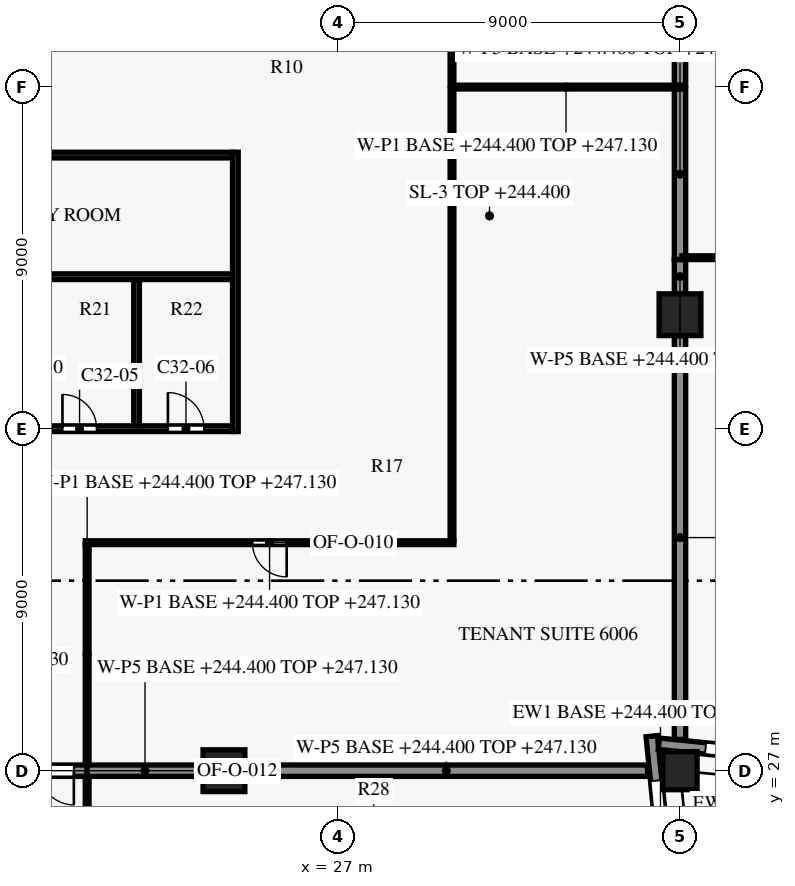
"""IFC4 building model, lengths in metres.
Left out: names, types, materials, properties, quantities, classifications, styles, units other than length and angle.
Written with IfcOpenShell. Run it as: python <this file> out.ifc"""

import sys

from ifc_helpers import new_model, si_unit, direction, frame, frame_2d, origin, origin_2d, place, context, subcontext, project, spatial, rectangle, extrude, element, fill, save


model = new_model("IFC4")
c1 = context("Model", 3, precision=1e-05, world=origin(), true_north=direction((0.0, 1.0)))
c2 = subcontext(c1, "Body", "Model", "MODEL_VIEW")
j1 = project(units=[si_unit("LENGTHUNIT", "METRE"), si_unit("PLANEANGLEUNIT", "RADIAN")], contexts=[c1])
p1 = place(None, origin())
s1 = spatial("IfcSite", under=j1, at=p1, CompositionType="ELEMENT")
p2 = place(p1, origin())
s2 = spatial("IfcBuilding", under=s1, at=p2, CompositionType="ELEMENT")
p3 = place(p2, frame((0.0, 0.0, 244.4)))
s3 = spatial("IfcBuildingStorey", under=s2, at=p3, CompositionType="ELEMENT", Elevation=244.4)
p4 = place(p3, frame((36.0, 27.0, 0.0), z_axis=(0.0, 0.0, 1.0), x_axis=(-0.0995038382, 0.995037178292, 0.0)))
e1 = element("IfcColumn", 1, at=p4, inside=s3, PredefinedType="COLUMN", context=c2, shape_type="SweptSolid", body=[
    extrude(rectangle(XDim=0.9, YDim=1.0, at=origin_2d()), origin(), (0.0, 0.0, 1.0), 3.8),
])
for number, where, z_axis, x_axis in (
    (2, (24.0, 27.0, 0.0), (0.0, 0.0, 1.0), (1.0, 0.0, 0.0)),
    (3, (36.0, 39.0, 0.0), (0.0, 0.0, 1.0), (1.0, 0.0, 0.0)),
):
    element("IfcColumn", number, at=place(p3, frame(where, z_axis=z_axis, x_axis=x_axis)), inside=s3, PredefinedType="COLUMN", context=c2, shape_type="SweptSolid", body=[
        extrude(rectangle(XDim=1.1, YDim=1.1, at=origin_2d()), origin(), (0.0, 0.0, 1.0), 3.8),
    ])
p5 = place(p3, frame((35.256, 27.908, 0.0), z_axis=(0.0, 0.0, 1.0), x_axis=(0.099535070904, -0.995034054523, 0.0)))
e4 = element("IfcWall", 4, at=p5, inside=s3, PredefinedType="SOLIDWALL", context=c2, shape_type="SweptSolid", body=[
    extrude(rectangle(XDim=4.626, YDim=0.3, at=frame_2d((2.313, 0.0))), origin(), (0.0, 0.0, 1.0), 3.0),
])
p6 = place(p5, frame((1.176, 0.0, 0.15)))
e5 = element("IfcOpeningElement", 5, at=p6, cuts=e4, PredefinedType="OPENING", context=c2, shape_type="SweptSolid", body=[
    extrude(rectangle(XDim=3.3, YDim=2.4, at=frame_2d((1.65, 1.2))), frame((0.0, 0.16, 0.0), z_axis=(0.0, -1.0, 0.0), x_axis=(1.0, 0.0, 0.0)), (0.0, 0.0, 1.0), 0.32),
])
p7 = place(p3, frame((45.015, 26.752, 0.0), z_axis=(0.0, 0.0, 1.0), x_axis=(-0.9950379439, 0.099496181828, 0.0)))
e6 = element("IfcWall", 6, at=p7, inside=s3, PredefinedType="SOLIDWALL", context=c2, shape_type="SweptSolid", body=[
    extrude(rectangle(XDim=9.621, YDim=0.3, at=frame_2d((4.811, 0.0))), origin(), (0.0, 0.0, 1.0), 3.0),
])
p8 = place(p7, frame((1.311, 0.0, 0.75)))
e7 = element("IfcOpeningElement", 7, at=p8, cuts=e6, PredefinedType="OPENING", context=c2, shape_type="SweptSolid", body=[
    extrude(rectangle(XDim=1.8, YDim=1.8, at=frame_2d((0.9, 0.9))), frame((0.0, 0.16, 0.0), z_axis=(0.0, -1.0, 0.0), x_axis=(1.0, 0.0, 0.0)), (0.0, 0.0, 1.0), 0.32),
])
p9 = place(p7, frame((5.083, 0.0, 0.15)))
e8 = element("IfcOpeningElement", 8, at=p9, cuts=e6, PredefinedType="OPENING", context=c2, shape_type="SweptSolid", body=[
    extrude(rectangle(XDim=3.3, YDim=2.4, at=frame_2d((1.65, 1.2))), frame((0.0, 0.16, 0.0), z_axis=(0.0, -1.0, 0.0), x_axis=(1.0, 0.0, 0.0)), (0.0, 0.0, 1.0), 0.32),
])
p10 = place(p3, frame((12.4, 36.0, 0.0), z_axis=(0.0, 0.0, 1.0), x_axis=(1.0, 0.0, 0.0)))
e9 = element("IfcWall", 9, at=p10, inside=s3, PredefinedType="SHEAR", context=c2, shape_type="SweptSolid", body=[
    extrude(rectangle(XDim=11.825, YDim=0.15, at=frame_2d((5.913, 0.0))), origin(), (0.0, 0.0, 1.0), 3.5),
])
p11 = place(p10, frame((1.05, 0.0, 0.0)))
e10 = element("IfcOpeningElement", 10, at=p11, cuts=e9, PredefinedType="OPENING", context=c2, shape_type="SweptSolid", body=[
    extrude(rectangle(XDim=0.9, YDim=2.1, at=frame_2d((0.45, 1.05))), frame((0.0, 0.085, 0.0), z_axis=(0.0, -1.0, 0.0), x_axis=(1.0, 0.0, 0.0)), (0.0, 0.0, 1.0), 0.17),
])
p12 = place(p10, frame((4.15, 0.0, 0.0)))
e11 = element("IfcOpeningElement", 11, at=p12, cuts=e9, PredefinedType="OPENING", context=c2, shape_type="SweptSolid", body=[
    extrude(rectangle(XDim=1.0, YDim=2.1, at=frame_2d((0.5, 1.05))), frame((0.0, 0.085, 0.0), z_axis=(0.0, -1.0, 0.0), x_axis=(1.0, 0.0, 0.0)), (0.0, 0.0, 1.0), 0.17),
])
p13 = place(p10, frame((7.35, 0.0, 0.0)))
e12 = element("IfcOpeningElement", 12, at=p13, cuts=e9, PredefinedType="OPENING", context=c2, shape_type="SweptSolid", body=[
    extrude(rectangle(XDim=0.9, YDim=2.1, at=frame_2d((0.45, 1.05))), frame((0.0, 0.085, 0.0), z_axis=(0.0, -1.0, 0.0), x_axis=(1.0, 0.0, 0.0)), (0.0, 0.0, 1.0), 0.17),
])
p14 = place(p10, frame((10.125, 0.0, 0.0)))
e13 = element("IfcOpeningElement", 13, at=p14, cuts=e9, PredefinedType="OPENING", context=c2, shape_type="SweptSolid", body=[
    extrude(rectangle(XDim=0.95, YDim=2.1, at=frame_2d((0.475, 1.05))), frame((0.0, 0.085, 0.0), z_axis=(0.0, -1.0, 0.0), x_axis=(1.0, 0.0, 0.0)), (0.0, 0.0, 1.0), 0.17),
])
p15 = place(p3, frame((8.1, 40.0, 0.0), z_axis=(0.0, 0.0, 1.0), x_axis=(1.0, 0.0, 0.0)))
e14 = element("IfcWall", 14, at=p15, inside=s3, PredefinedType="PARTITIONING", context=c2, shape_type="SweptSolid", body=[
    extrude(rectangle(XDim=16.125, YDim=0.15, at=frame_2d((8.062, 0.0))), origin(), (0.0, 0.0, 1.0), 3.35),
])
p16 = place(p3, frame((8.1, 43.2, 0.0), z_axis=(0.0, 0.0, 1.0), x_axis=(1.0, 0.0, 0.0)))
e15 = element("IfcWall", 15, at=p16, inside=s3, PredefinedType="PARTITIONING", context=c2, shape_type="SweptSolid", body=[
    extrude(rectangle(XDim=16.125, YDim=0.15, at=frame_2d((8.062, 0.0))), origin(), (0.0, 0.0, 1.0), 3.35),
])
p17 = place(p16, frame((1.575, 0.0, 0.0)))
e16 = element("IfcOpeningElement", 16, at=p17, cuts=e15, PredefinedType="OPENING", context=c2, shape_type="SweptSolid", body=[
    extrude(rectangle(XDim=0.9, YDim=2.1, at=frame_2d((0.45, 1.05))), frame((0.0, 0.085, 0.0), z_axis=(0.0, -1.0, 0.0), x_axis=(1.0, 0.0, 0.0)), (0.0, 0.0, 1.0), 0.17),
])
p18 = place(p16, frame((9.675, 0.0, 0.0)))
e17 = element("IfcOpeningElement", 17, at=p18, cuts=e15, PredefinedType="OPENING", context=c2, shape_type="SweptSolid", body=[
    extrude(rectangle(XDim=0.9, YDim=2.1, at=frame_2d((0.45, 1.05))), frame((0.0, 0.085, 0.0), z_axis=(0.0, -1.0, 0.0), x_axis=(1.0, 0.0, 0.0)), (0.0, 0.0, 1.0), 0.17),
])
p19 = place(p3, frame((21.7, 36.075, 0.0), z_axis=(0.0, 0.0, 1.0), x_axis=(0.0, 1.0, 0.0)))
e18 = element("IfcWall", 18, at=p19, inside=s3, PredefinedType="PARTITIONING", context=c2, shape_type="SweptSolid", body=[
    extrude(rectangle(XDim=3.85, YDim=0.15, at=frame_2d((1.925, 0.0))), origin(), (0.0, 0.0, 1.0), 3.35),
])
p20 = place(p3, frame((24.3, 35.925, 0.0), z_axis=(0.0, 0.0, 1.0), x_axis=(0.0, 1.0, 0.0)))
e19 = element("IfcWall", 19, at=p20, inside=s3, PredefinedType="PARTITIONING", context=c2, shape_type="SweptSolid", body=[
    extrude(rectangle(XDim=7.35, YDim=0.15, at=frame_2d((3.675, 0.0))), origin(), (0.0, 0.0, 1.0), 3.35),
])
p21 = place(p3, frame((20.4, 26.83, 0.0), z_axis=(0.0, 0.0, 1.0), x_axis=(0.0, -1.0, 0.0)))
e20 = element("IfcWall", 20, at=p21, inside=s3, PredefinedType="PARTITIONING", context=c2, shape_type="SweptSolid", body=[
    extrude(rectangle(XDim=4.28, YDim=0.1, at=frame_2d((2.14, 0.0))), origin(), (0.0, 0.0, 1.0), 2.73),
])
p22 = place(p21, frame((1.18, 0.0, 0.0)))
e21 = element("IfcOpeningElement", 21, at=p22, cuts=e20, PredefinedType="OPENING", context=c2, shape_type="SweptSolid", body=[
    extrude(rectangle(XDim=1.8, YDim=2.1, at=frame_2d((0.9, 1.05))), frame((0.0, 0.06, 0.0), z_axis=(0.0, -1.0, 0.0), x_axis=(1.0, 0.0, 0.0)), (0.0, 0.0, 1.0), 0.12),
])
p23 = place(p3, frame((20.4, 27.0, 0.0), z_axis=(0.0, 0.0, 1.0), x_axis=(-1.0, 0.0, 0.0)))
e22 = element("IfcWall", 22, at=p23, inside=s3, PredefinedType="PARTITIONING", context=c2, shape_type="SweptSolid", body=[
    extrude(rectangle(XDim=2.5, YDim=0.3, at=frame_2d((1.25, 0.0))), origin(), (0.0, 0.0, 1.0), 2.73),
])
p24 = place(p23, frame((0.35, 0.0, 0.0)))
e23 = element("IfcOpeningElement", 23, at=p24, cuts=e22, PredefinedType="OPENING", context=c2, shape_type="SweptSolid", body=[
    extrude(rectangle(XDim=1.8, YDim=2.1, at=frame_2d((0.9, 1.05))), frame((0.0, 0.16, 0.0), z_axis=(0.0, -1.0, 0.0), x_axis=(1.0, 0.0, 0.0)), (0.0, 0.0, 1.0), 0.32),
])
p25 = place(p3, frame((20.4, 27.0, 0.0), z_axis=(0.0, 0.0, 1.0), x_axis=(1.0, 0.0, 0.0)))
e24 = element("IfcWall", 24, at=p25, inside=s3, PredefinedType="PARTITIONING", context=c2, shape_type="SweptSolid", body=[
    extrude(rectangle(XDim=3.045, YDim=0.3, at=frame_2d((1.522, 0.0))), origin(), (0.0, 0.0, 1.0), 2.73),
])
p26 = place(p3, frame((24.555, 27.0, 0.0), z_axis=(0.0, 0.0, 1.0), x_axis=(1.0, 0.0, 0.0)))
e25 = element("IfcWall", 25, at=p26, inside=s3, PredefinedType="PARTITIONING", context=c2, shape_type="SweptSolid", body=[
    extrude(rectangle(XDim=10.591, YDim=0.3, at=frame_2d((5.295, 0.0))), origin(), (0.0, 0.0, 1.0), 2.73),
])
p27 = place(p3, frame((36.0, 27.824, 0.0), z_axis=(0.0, 0.0, 1.0), x_axis=(0.0, 1.0, 0.0)))
e26 = element("IfcWall", 26, at=p27, inside=s3, PredefinedType="PARTITIONING", context=c2, shape_type="SweptSolid", body=[
    extrude(rectangle(XDim=10.621, YDim=0.3, at=frame_2d((5.311, 0.0))), origin(), (0.0, 0.0, 1.0), 2.73),
])
p28 = place(p3, frame((20.4, 32.95, 0.0), z_axis=(0.0, 0.0, 1.0), x_axis=(0.0, -1.0, 0.0)))
e27 = element("IfcWall", 27, at=p28, inside=s3, PredefinedType="PARTITIONING", context=c2, shape_type="SweptSolid", body=[
    extrude(rectangle(XDim=5.78, YDim=0.1, at=frame_2d((2.89, 0.0))), origin(), (0.0, 0.0, 1.0), 2.73),
])
p29 = place(p3, frame((30.05, 33.0, 0.0), z_axis=(0.0, 0.0, 1.0), x_axis=(-1.0, 0.0, 0.0)))
e28 = element("IfcWall", 28, at=p29, inside=s3, PredefinedType="PARTITIONING", context=c2, shape_type="SweptSolid", body=[
    extrude(rectangle(XDim=9.7, YDim=0.1, at=frame_2d((4.85, 0.0))), origin(), (0.0, 0.0, 1.0), 2.73),
])
p30 = place(p29, frame((4.4, 0.0, 0.0)))
e29 = element("IfcOpeningElement", 29, at=p30, cuts=e28, PredefinedType="OPENING", context=c2, shape_type="SweptSolid", body=[
    extrude(rectangle(XDim=0.9, YDim=2.1, at=frame_2d((0.45, 1.05))), frame((0.0, 0.06, 0.0), z_axis=(0.0, -1.0, 0.0), x_axis=(1.0, 0.0, 0.0)), (0.0, 0.0, 1.0), 0.12),
])
p31 = place(p3, frame((36.0, 39.555, 0.0), z_axis=(0.0, 0.0, 1.0), x_axis=(0.0, 1.0, 0.0)))
e30 = element("IfcWall", 30, at=p31, inside=s3, PredefinedType="PARTITIONING", context=c2, shape_type="SweptSolid", body=[
    extrude(rectangle(XDim=0.895, YDim=0.3, at=frame_2d((0.448, 0.0))), origin(), (0.0, 0.0, 1.0), 2.73),
])
p32 = place(p3, frame((49.45, 40.5, 0.0), z_axis=(0.0, 0.0, 1.0), x_axis=(-1.0, 0.0, 0.0)))
e31 = element("IfcWall", 31, at=p32, inside=s3, PredefinedType="PARTITIONING", context=c2, shape_type="SweptSolid", body=[
    extrude(rectangle(XDim=13.4, YDim=0.1, at=frame_2d((6.7, 0.0))), origin(), (0.0, 0.0, 1.0), 2.73),
])
p33 = place(p32, frame((8.05, 0.0, 0.0)))
e32 = element("IfcOpeningElement", 32, at=p33, cuts=e31, PredefinedType="OPENING", context=c2, shape_type="SweptSolid", body=[
    extrude(rectangle(XDim=1.8, YDim=2.1, at=frame_2d((0.9, 1.05))), frame((0.0, 0.06, 0.0), z_axis=(0.0, -1.0, 0.0), x_axis=(1.0, 0.0, 0.0)), (0.0, 0.0, 1.0), 0.12),
])
p34 = place(p3, frame((36.0, 40.455, 0.0), z_axis=(0.0, 0.0, 1.0), x_axis=(0.0, 1.0, 0.0)))
e33 = element("IfcWall", 33, at=p34, inside=s3, PredefinedType="PARTITIONING", context=c2, shape_type="SweptSolid", body=[
    extrude(rectangle(XDim=4.485, YDim=0.3, at=frame_2d((2.242, 0.0))), origin(), (0.0, 0.0, 1.0), 2.73),
])
p35 = place(p3, frame((30.0, 44.94, 0.0), z_axis=(0.0, 0.0, 1.0), x_axis=(0.0, -1.0, 0.0)))
e34 = element("IfcWall", 34, at=p35, inside=s3, PredefinedType="PARTITIONING", context=c2, shape_type="SweptSolid", body=[
    extrude(rectangle(XDim=11.89, YDim=0.1, at=frame_2d((5.945, 0.0))), origin(), (0.0, 0.0, 1.0), 3.33),
])
p36 = place(p3, frame((30.05, 44.99, 0.0), z_axis=(0.0, 0.0, 1.0), x_axis=(1.0, 0.0, 0.0)))
e35 = element("IfcWall", 35, at=p36, inside=s3, PredefinedType="PARTITIONING", context=c2, shape_type="SweptSolid", body=[
    extrude(rectangle(XDim=5.9, YDim=0.1, at=frame_2d((2.95, 0.0))), origin(), (0.0, 0.0, 1.0), 2.73),
])
p37 = place(p3, frame((36.0, 45.04, 0.0), z_axis=(0.0, 0.0, 1.0), x_axis=(0.0, 1.0, 0.0)))
e36 = element("IfcWall", 36, at=p37, inside=s3, PredefinedType="PARTITIONING", context=c2, shape_type="SweptSolid", body=[
    extrude(rectangle(XDim=2.91, YDim=0.3, at=frame_2d((1.455, 0.0))), origin(), (0.0, 0.0, 1.0), 2.73),
])
p38 = place(p3, frame((30.0, 54.95, 0.0), z_axis=(0.0, 0.0, 1.0), x_axis=(0.0, -1.0, 0.0)))
e37 = element("IfcWall", 37, at=p38, inside=s3, PredefinedType="PARTITIONING", context=c2, shape_type="SweptSolid", body=[
    extrude(rectangle(XDim=9.91, YDim=0.1, at=frame_2d((4.955, 0.0))), origin(), (0.0, 0.0, 1.0), 3.33),
])
p39 = place(p38, frame((4.505, 0.0, 0.0)))
e38 = element("IfcOpeningElement", 38, at=p39, cuts=e37, PredefinedType="OPENING", context=c2, shape_type="SweptSolid", body=[
    extrude(rectangle(XDim=0.9, YDim=2.1, at=frame_2d((0.45, 1.05))), frame((0.0, 0.06, 0.0), z_axis=(0.0, -1.0, 0.0), x_axis=(1.0, 0.0, 0.0)), (0.0, 0.0, 1.0), 0.12),
])
p40 = place(p6, origin())
e39 = element("IfcWindow", 39, at=p40, inside=s3, PartitioningType="SINGLE_PANEL", PredefinedType="WINDOW", context=c2, shape_type="SweptSolid", body=[
    extrude(rectangle(XDim=3.3, YDim=2.4, at=frame_2d((1.65, 1.2))), frame((0.0, 0.03, 0.0), z_axis=(0.0, -1.0, 0.0), x_axis=(1.0, 0.0, 0.0)), (0.0, 0.0, 1.0), 0.06),
])
fill(e5, e39)
p41 = place(p9, origin())
e40 = element("IfcWindow", 40, at=p41, inside=s3, PartitioningType="SINGLE_PANEL", PredefinedType="WINDOW", context=c2, shape_type="SweptSolid", body=[
    extrude(rectangle(XDim=3.3, YDim=2.4, at=frame_2d((1.65, 1.2))), frame((0.0, 0.03, 0.0), z_axis=(0.0, -1.0, 0.0), x_axis=(1.0, 0.0, 0.0)), (0.0, 0.0, 1.0), 0.06),
])
fill(e8, e40)
p42 = place(p13, origin())
e41 = element("IfcDoor", 41, at=p42, inside=s3, OperationType="SINGLE_SWING_RIGHT", PredefinedType="DOOR", context=c2, shape_type="SweptSolid", body=[
    extrude(rectangle(XDim=0.9, YDim=2.1, at=frame_2d((0.45, 1.05))), frame((0.0, 0.025, 0.0), z_axis=(0.0, -1.0, 0.0), x_axis=(1.0, 0.0, 0.0)), (0.0, 0.0, 1.0), 0.05),
])
fill(e12, e41)
p43 = place(p14, origin())
e42 = element("IfcDoor", 42, at=p43, inside=s3, OperationType="SINGLE_SWING_LEFT", PredefinedType="DOOR", context=c2, shape_type="SweptSolid", body=[
    extrude(rectangle(XDim=0.95, YDim=2.1, at=frame_2d((0.475, 1.05))), frame((0.0, 0.025, 0.0), z_axis=(0.0, -1.0, 0.0), x_axis=(1.0, 0.0, 0.0)), (0.0, 0.0, 1.0), 0.05),
])
fill(e13, e42)
p44 = place(p30, origin())
e43 = element("IfcDoor", 43, at=p44, inside=s3, OperationType="SINGLE_SWING_LEFT", PredefinedType="DOOR", context=c2, shape_type="SweptSolid", body=[
    extrude(rectangle(XDim=0.9, YDim=2.1, at=frame_2d((0.45, 1.05))), frame((0.0, 0.025, 0.0), z_axis=(0.0, -1.0, 0.0), x_axis=(1.0, 0.0, 0.0)), (0.0, 0.0, 1.0), 0.05),
])
fill(e29, e43)
p45 = place(p24, origin())
e44 = element("IfcDoor", 44, at=p45, inside=s3, OperationType="DOUBLE_DOOR_SINGLE_SWING", PredefinedType="DOOR", context=c2, shape_type="SweptSolid", body=[
    extrude(rectangle(XDim=1.8, YDim=2.1, at=frame_2d((0.9, 1.05))), frame((0.0, 0.025, 0.0), z_axis=(0.0, -1.0, 0.0), x_axis=(1.0, 0.0, 0.0)), (0.0, 0.0, 1.0), 0.05),
])
fill(e23, e44)
save(model, sys.argv[1])
